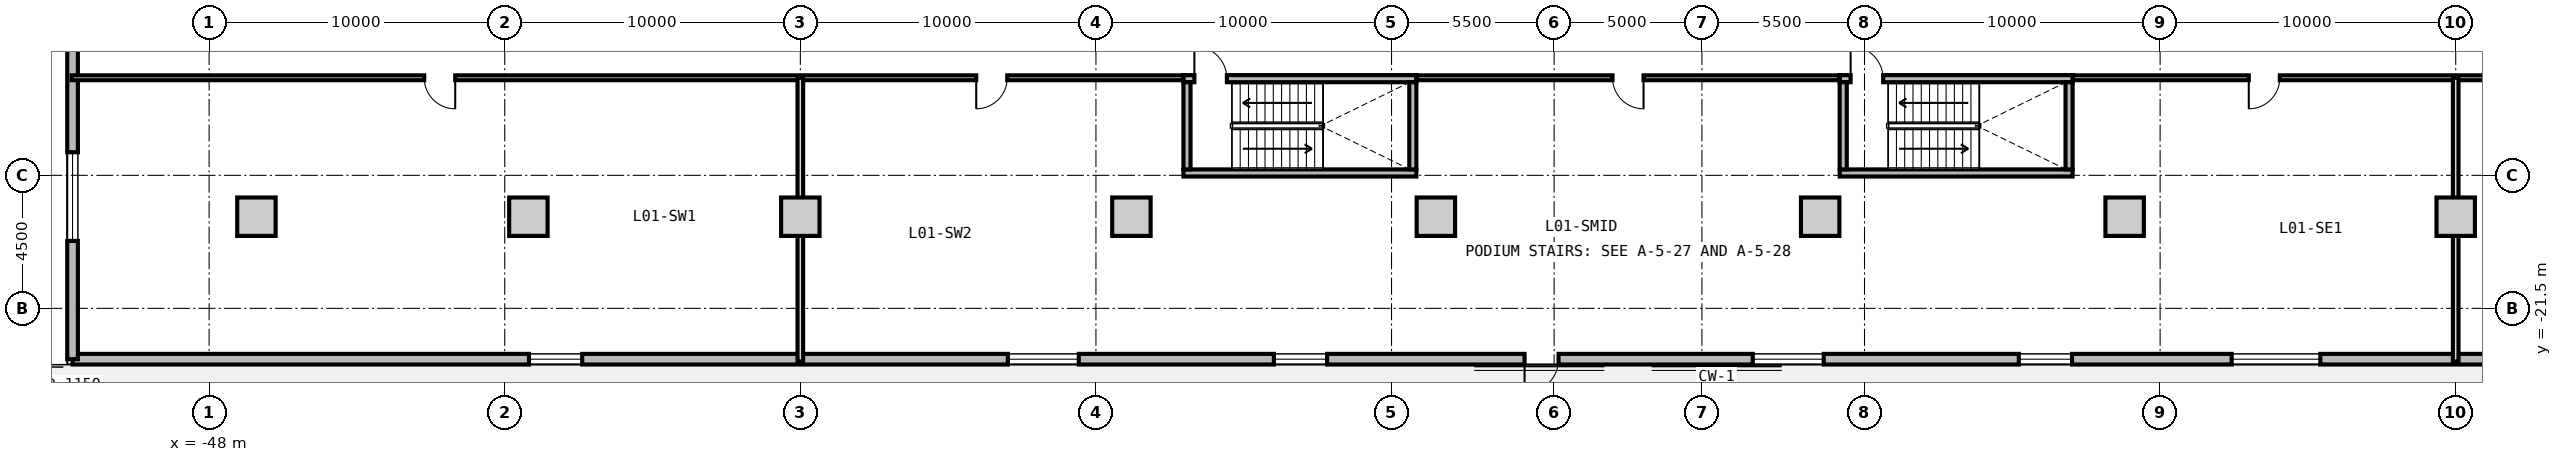
"""IFC4 building model, lengths in metres.
Left out: names, types, materials, properties, quantities, classifications, styles, units other than length and angle.
Written with IfcOpenShell. Run it as: python <this file> out.ifc"""

import sys

from ifc_helpers import new_model, si_unit, direction, frame, frame_2d, origin, origin_2d, place, context, subcontext, project, spatial, rectangle, extrude, source, transform, mapped, element, fill, save


model = new_model("IFC4")
c1 = context("Model", 3, precision=1e-05, world=origin(), true_north=direction((0.0, 1.0)))
c2 = subcontext(c1, "Body", "Model", "MODEL_VIEW")
j1 = project(units=[si_unit("LENGTHUNIT", "METRE"), si_unit("PLANEANGLEUNIT", "RADIAN")], contexts=[c1])
p1 = place(None, origin())
s1 = spatial("IfcSite", under=j1, at=p1, CompositionType="ELEMENT")
p2 = place(p1, origin())
s2 = spatial("IfcBuilding", under=s1, at=p2, CompositionType="ELEMENT")
p3 = place(p2, frame((0.0, 0.0, 4.2)))
s3 = spatial("IfcBuildingStorey", under=s2, at=p3, CompositionType="ELEMENT", Elevation=4.2)
m1 = source(origin(), c2, "Body", "SweptSolid", [
    extrude(rectangle(XDim=1.3, YDim=1.3, at=origin_2d()), origin(), (0.0, 0.0, 1.0), 4.2),
])
for number, where, z_axis, x_axis in (
    (1, (-46.4, -18.4, 0.0), (0.0, 0.0, 1.0), (1.0, 0.0, 0.0)),
    (2, (-37.2, -18.4, 0.0), (0.0, 0.0, 1.0), (1.0, 0.0, 0.0)),
    (3, (-28.0, -18.4, 0.0), (0.0, 0.0, 1.0), (1.0, 0.0, 0.0)),
    (4, (-16.8, -18.4, 0.0), (0.0, 0.0, 1.0), (1.0, 0.0, 0.0)),
    (5, (-6.5, -18.4, 0.0), (0.0, 0.0, 1.0), (1.0, 0.0, 0.0)),
    (6, (6.5, -18.4, 0.0), (0.0, 0.0, 1.0), (1.0, 0.0, 0.0)),
    (7, (16.8, -18.4, 0.0), (0.0, 0.0, 1.0), (1.0, 0.0, 0.0)),
    (8, (28.0, -18.4, 0.0), (0.0, 0.0, 1.0), (1.0, 0.0, 0.0)),
):
    element("IfcColumn", number, at=place(p3, frame(where, z_axis=z_axis, x_axis=x_axis)), inside=s3, PredefinedType="COLUMN", context=c2, shape_type="MappedRepresentation", body=[
        mapped(m1, transform((0.0, 0.0, 0.0), x_axis=(1.0, 0.0, 0.0), y_axis=(0.0, 1.0, 0.0), z_axis=(0.0, 0.0, 1.0), scale=1.0)),
    ])
m2 = source(origin(), c2, "Body", "SweptSolid", [
    extrude(rectangle(XDim=105.24, YDim=0.36, at=frame_2d((52.62, 0.0))), origin(), (0.0, 0.0, 1.0), 3.88),
])
p4 = place(p3, frame((52.62, -23.22, 0.0), z_axis=(0.0, 0.0, 1.0), x_axis=(-1.0, 0.0, 0.0)))
e9 = element("IfcWall", 9, at=p4, inside=s3, PredefinedType="SOLIDWALL", context=c2, shape_type="MappedRepresentation", body=[
    mapped(m2, transform((0.0, 0.0, 0.0), x_axis=(1.0, 0.0, 0.0), y_axis=(0.0, 1.0, 0.0), z_axis=(0.0, 0.0, 1.0), scale=1.0)),
])
p5 = place(p4, frame((54.97, 0.0, 0.0)))
e10 = element("IfcOpeningElement", 10, at=p5, cuts=e9, PredefinedType="OPENING", context=c2, shape_type="SweptSolid", body=[
    extrude(rectangle(XDim=1.15, YDim=2.25, at=frame_2d((0.575, 1.125))), frame((0.0, 0.19, 0.0), z_axis=(0.0, -1.0, 0.0), x_axis=(1.0, 0.0, 0.0)), (0.0, 0.0, 1.0), 0.38),
])
p6 = place(p4, frame((4.0, 0.0, 0.85)))
e11 = element("IfcOpeningElement", 11, at=p6, cuts=e9, PredefinedType="OPENING", context=c2, shape_type="SweptSolid", body=[
    extrude(rectangle(XDim=3.0, YDim=2.1, at=frame_2d((1.5, 1.05))), frame((0.0, 0.19, 0.0), z_axis=(0.0, -1.0, 0.0), x_axis=(1.0, 0.0, 0.0)), (0.0, 0.0, 1.0), 0.38),
])
p7 = place(p4, frame((12.4, 0.0, 0.9)))
e12 = element("IfcOpeningElement", 12, at=p7, cuts=e9, PredefinedType="OPENING", context=c2, shape_type="SweptSolid", body=[
    extrude(rectangle(XDim=1.8, YDim=2.0, at=frame_2d((0.9, 1.0))), frame((0.0, 0.19, 0.0), z_axis=(0.0, -1.0, 0.0), x_axis=(1.0, 0.0, 0.0)), (0.0, 0.0, 1.0), 0.38),
])
p8 = place(p4, frame((20.8, 0.0, 0.85)))
e13 = element("IfcOpeningElement", 13, at=p8, cuts=e9, PredefinedType="OPENING", context=c2, shape_type="SweptSolid", body=[
    extrude(rectangle(XDim=2.4, YDim=2.2, at=frame_2d((1.2, 1.1))), frame((0.0, 0.19, 0.0), z_axis=(0.0, -1.0, 0.0), x_axis=(1.0, 0.0, 0.0)), (0.0, 0.0, 1.0), 0.38),
])
p9 = place(p4, frame((29.2, 0.0, 0.85)))
e14 = element("IfcOpeningElement", 14, at=p9, cuts=e9, PredefinedType="OPENING", context=c2, shape_type="SweptSolid", body=[
    extrude(rectangle(XDim=3.0, YDim=2.1, at=frame_2d((1.5, 1.05))), frame((0.0, 0.19, 0.0), z_axis=(0.0, -1.0, 0.0), x_axis=(1.0, 0.0, 0.0)), (0.0, 0.0, 1.0), 0.38),
])
p10 = place(p4, frame((37.6, 0.0, 0.9)))
e15 = element("IfcOpeningElement", 15, at=p10, cuts=e9, PredefinedType="OPENING", context=c2, shape_type="SweptSolid", body=[
    extrude(rectangle(XDim=1.8, YDim=2.0, at=frame_2d((0.9, 1.0))), frame((0.0, 0.19, 0.0), z_axis=(0.0, -1.0, 0.0), x_axis=(1.0, 0.0, 0.0)), (0.0, 0.0, 1.0), 0.38),
])
p11 = place(p4, frame((46.0, 0.0, 0.85)))
e16 = element("IfcOpeningElement", 16, at=p11, cuts=e9, PredefinedType="OPENING", context=c2, shape_type="SweptSolid", body=[
    extrude(rectangle(XDim=2.4, YDim=2.2, at=frame_2d((1.2, 1.1))), frame((0.0, 0.19, 0.0), z_axis=(0.0, -1.0, 0.0), x_axis=(1.0, 0.0, 0.0)), (0.0, 0.0, 1.0), 0.38),
])
p12 = place(p4, frame((62.8, 0.0, 0.9)))
e17 = element("IfcOpeningElement", 17, at=p12, cuts=e9, PredefinedType="OPENING", context=c2, shape_type="SweptSolid", body=[
    extrude(rectangle(XDim=1.8, YDim=2.0, at=frame_2d((0.9, 1.0))), frame((0.0, 0.19, 0.0), z_axis=(0.0, -1.0, 0.0), x_axis=(1.0, 0.0, 0.0)), (0.0, 0.0, 1.0), 0.38),
])
p13 = place(p4, frame((71.2, 0.0, 0.85)))
e18 = element("IfcOpeningElement", 18, at=p13, cuts=e9, PredefinedType="OPENING", context=c2, shape_type="SweptSolid", body=[
    extrude(rectangle(XDim=2.4, YDim=2.2, at=frame_2d((1.2, 1.1))), frame((0.0, 0.19, 0.0), z_axis=(0.0, -1.0, 0.0), x_axis=(1.0, 0.0, 0.0)), (0.0, 0.0, 1.0), 0.38),
])
p14 = place(p4, frame((88.0, 0.0, 0.9)))
e19 = element("IfcOpeningElement", 19, at=p14, cuts=e9, PredefinedType="OPENING", context=c2, shape_type="SweptSolid", body=[
    extrude(rectangle(XDim=1.8, YDim=2.0, at=frame_2d((0.9, 1.0))), frame((0.0, 0.19, 0.0), z_axis=(0.0, -1.0, 0.0), x_axis=(1.0, 0.0, 0.0)), (0.0, 0.0, 1.0), 0.38),
])
m3 = source(origin(), c2, "Body", "SweptSolid", [
    extrude(rectangle(XDim=46.44, YDim=0.36, at=frame_2d((23.22, 0.0))), origin(), (0.0, 0.0, 1.0), 3.88),
])
p15 = place(p3, frame((-52.62, -23.22, 0.0), z_axis=(0.0, 0.0, 1.0), x_axis=(0.0, 1.0, 0.0)))
e20 = element("IfcWall", 20, at=p15, inside=s3, PredefinedType="SOLIDWALL", context=c2, shape_type="MappedRepresentation", body=[
    mapped(m3, transform((0.0, 0.0, 0.0), x_axis=(1.0, 0.0, 0.0), y_axis=(0.0, 1.0, 0.0), z_axis=(0.0, 0.0, 1.0), scale=1.0)),
])
p16 = place(p15, frame((4.0, 0.0, 0.85)))
e21 = element("IfcOpeningElement", 21, at=p16, cuts=e20, PredefinedType="OPENING", context=c2, shape_type="SweptSolid", body=[
    extrude(rectangle(XDim=3.0, YDim=2.1, at=frame_2d((1.5, 1.05))), frame((0.0, 0.19, 0.0), z_axis=(0.0, -1.0, 0.0), x_axis=(1.0, 0.0, 0.0)), (0.0, 0.0, 1.0), 0.38),
])
p17 = place(p15, frame((12.4, 0.0, 0.9)))
e22 = element("IfcOpeningElement", 22, at=p17, cuts=e20, PredefinedType="OPENING", context=c2, shape_type="SweptSolid", body=[
    extrude(rectangle(XDim=1.8, YDim=2.0, at=frame_2d((0.9, 1.0))), frame((0.0, 0.19, 0.0), z_axis=(0.0, -1.0, 0.0), x_axis=(1.0, 0.0, 0.0)), (0.0, 0.0, 1.0), 0.38),
])
m4 = source(origin(), c2, "Body", "SweptSolid", [
    extrude(rectangle(XDim=7.88, YDim=0.24, at=frame_2d((3.94, 0.0))), origin(), (0.0, 0.0, 1.0), 3.88),
])
p18 = place(p3, frame((-15.04, -13.73, 0.0), z_axis=(0.0, 0.0, 1.0), x_axis=(1.0, 0.0, 0.0)))
e23 = element("IfcWall", 23, at=p18, inside=s3, PredefinedType="PARTITIONING", context=c2, shape_type="MappedRepresentation", body=[
    mapped(m4, transform((0.0, 0.0, 0.0), x_axis=(1.0, 0.0, 0.0), y_axis=(0.0, 1.0, 0.0), z_axis=(0.0, 0.0, 1.0), scale=1.0)),
])
p19 = place(p18, frame((0.37, 0.0, 0.0)))
e24 = element("IfcOpeningElement", 24, at=p19, cuts=e23, PredefinedType="OPENING", context=c2, shape_type="SweptSolid", body=[
    extrude(rectangle(XDim=1.1, YDim=2.15, at=frame_2d((0.55, 1.075))), frame((0.0, 0.13, 0.0), z_axis=(0.0, -1.0, 0.0), x_axis=(1.0, 0.0, 0.0)), (0.0, 0.0, 1.0), 0.26),
])
p20 = place(p3, frame((-15.04, -16.92, 0.0), z_axis=(0.0, 0.0, 1.0), x_axis=(1.0, 0.0, 0.0)))
e25 = element("IfcWall", 25, at=p20, inside=s3, PredefinedType="PARTITIONING", context=c2, shape_type="MappedRepresentation", body=[
    mapped(m4, transform((0.0, 0.0, 0.0), x_axis=(1.0, 0.0, 0.0), y_axis=(0.0, 1.0, 0.0), z_axis=(0.0, 0.0, 1.0), scale=1.0)),
])
m5 = source(origin(), c2, "Body", "SweptSolid", [
    extrude(rectangle(XDim=2.95, YDim=0.24, at=frame_2d((1.475, 0.0))), origin(), (0.0, 0.0, 1.0), 3.88),
])
for number, where, z_axis, x_axis in (
    (26, (-14.92, -16.8, 0.0), (0.0, 0.0, 1.0), (0.0, 1.0, 0.0)),
    (27, (-7.28, -16.8, 0.0), (0.0, 0.0, 1.0), (0.0, 1.0, 0.0)),
):
    element("IfcWall", number, at=place(p3, frame(where, z_axis=z_axis, x_axis=x_axis)), inside=s3, PredefinedType="PARTITIONING", context=c2, shape_type="MappedRepresentation", body=[
        mapped(m5, transform((0.0, 0.0, 0.0), x_axis=(1.0, 0.0, 0.0), y_axis=(0.0, 1.0, 0.0), z_axis=(0.0, 0.0, 1.0), scale=1.0)),
    ])
p21 = place(p3, frame((7.16, -13.73, 0.0), z_axis=(0.0, 0.0, 1.0), x_axis=(1.0, 0.0, 0.0)))
e28 = element("IfcWall", 28, at=p21, inside=s3, PredefinedType="PARTITIONING", context=c2, shape_type="MappedRepresentation", body=[
    mapped(m4, transform((0.0, 0.0, 0.0), x_axis=(1.0, 0.0, 0.0), y_axis=(0.0, 1.0, 0.0), z_axis=(0.0, 0.0, 1.0), scale=1.0)),
])
p22 = place(p21, frame((0.37, 0.0, 0.0)))
e29 = element("IfcOpeningElement", 29, at=p22, cuts=e28, PredefinedType="OPENING", context=c2, shape_type="SweptSolid", body=[
    extrude(rectangle(XDim=1.1, YDim=2.15, at=frame_2d((0.55, 1.075))), frame((0.0, 0.13, 0.0), z_axis=(0.0, -1.0, 0.0), x_axis=(1.0, 0.0, 0.0)), (0.0, 0.0, 1.0), 0.26),
])
p23 = place(p3, frame((7.16, -16.92, 0.0), z_axis=(0.0, 0.0, 1.0), x_axis=(1.0, 0.0, 0.0)))
e30 = element("IfcWall", 30, at=p23, inside=s3, PredefinedType="PARTITIONING", context=c2, shape_type="MappedRepresentation", body=[
    mapped(m4, transform((0.0, 0.0, 0.0), x_axis=(1.0, 0.0, 0.0), y_axis=(0.0, 1.0, 0.0), z_axis=(0.0, 0.0, 1.0), scale=1.0)),
])
for number, where, z_axis, x_axis in (
    (31, (7.28, -16.8, 0.0), (0.0, 0.0, 1.0), (0.0, 1.0, 0.0)),
    (32, (14.92, -16.8, 0.0), (0.0, 0.0, 1.0), (0.0, 1.0, 0.0)),
):
    element("IfcWall", number, at=place(p3, frame(where, z_axis=z_axis, x_axis=x_axis)), inside=s3, PredefinedType="PARTITIONING", context=c2, shape_type="MappedRepresentation", body=[
        mapped(m5, transform((0.0, 0.0, 0.0), x_axis=(1.0, 0.0, 0.0), y_axis=(0.0, 1.0, 0.0), z_axis=(0.0, 0.0, 1.0), scale=1.0)),
    ])
m6 = source(origin(), c2, "Body", "SweptSolid", [
    extrude(rectangle(XDim=37.6, YDim=0.165, at=frame_2d((18.8, 0.0))), origin(), (0.0, 0.0, 1.0), 3.865),
])
p24 = place(p3, frame((-52.65, -13.7, 0.0), z_axis=(0.0, 0.0, 1.0), x_axis=(1.0, 0.0, 0.0)))
e33 = element("IfcWall", 33, at=p24, inside=s3, PredefinedType="PARTITIONING", context=c2, shape_type="MappedRepresentation", body=[
    mapped(m6, transform((0.0, 0.0, 0.0), x_axis=(1.0, 0.0, 0.0), y_axis=(0.0, 1.0, 0.0), z_axis=(0.0, 0.0, 1.0), scale=1.0)),
])
p25 = place(p24, frame((11.925, 0.0, 0.0)))
e34 = element("IfcOpeningElement", 34, at=p25, cuts=e33, PredefinedType="OPENING", context=c2, shape_type="SweptSolid", body=[
    extrude(rectangle(XDim=1.05, YDim=2.15, at=frame_2d((0.525, 1.075))), frame((0.0, 0.093, 0.0), z_axis=(0.0, -1.0, 0.0), x_axis=(1.0, 0.0, 0.0)), (0.0, 0.0, 1.0), 0.185),
])
p26 = place(p24, frame((30.6, 0.0, 0.0)))
e35 = element("IfcOpeningElement", 35, at=p26, cuts=e33, PredefinedType="OPENING", context=c2, shape_type="SweptSolid", body=[
    extrude(rectangle(XDim=1.05, YDim=2.15, at=frame_2d((0.525, 1.075))), frame((0.0, 0.093, 0.0), z_axis=(0.0, -1.0, 0.0), x_axis=(1.0, 0.0, 0.0)), (0.0, 0.0, 1.0), 0.185),
])
m7 = source(origin(), c2, "Body", "SweptSolid", [
    extrude(rectangle(XDim=14.3, YDim=0.165, at=frame_2d((7.15, 0.0))), origin(), (0.0, 0.0, 1.0), 3.865),
])
p27 = place(p3, frame((-7.15, -13.7, 0.0), z_axis=(0.0, 0.0, 1.0), x_axis=(1.0, 0.0, 0.0)))
e36 = element("IfcWall", 36, at=p27, inside=s3, PredefinedType="PARTITIONING", context=c2, shape_type="MappedRepresentation", body=[
    mapped(m7, transform((0.0, 0.0, 0.0), x_axis=(1.0, 0.0, 0.0), y_axis=(0.0, 1.0, 0.0), z_axis=(0.0, 0.0, 1.0), scale=1.0)),
])
p28 = place(p27, frame((6.625, 0.0, 0.0)))
e37 = element("IfcOpeningElement", 37, at=p28, cuts=e36, PredefinedType="OPENING", context=c2, shape_type="SweptSolid", body=[
    extrude(rectangle(XDim=1.05, YDim=2.15, at=frame_2d((0.525, 1.075))), frame((0.0, 0.093, 0.0), z_axis=(0.0, -1.0, 0.0), x_axis=(1.0, 0.0, 0.0)), (0.0, 0.0, 1.0), 0.185),
])
p29 = place(p3, frame((15.05, -13.7, 0.0), z_axis=(0.0, 0.0, 1.0), x_axis=(1.0, 0.0, 0.0)))
e38 = element("IfcWall", 38, at=p29, inside=s3, PredefinedType="PARTITIONING", context=c2, shape_type="MappedRepresentation", body=[
    mapped(m6, transform((0.0, 0.0, 0.0), x_axis=(1.0, 0.0, 0.0), y_axis=(0.0, 1.0, 0.0), z_axis=(0.0, 0.0, 1.0), scale=1.0)),
])
p30 = place(p29, frame((5.95, 0.0, 0.0)))
e39 = element("IfcOpeningElement", 39, at=p30, cuts=e38, PredefinedType="OPENING", context=c2, shape_type="SweptSolid", body=[
    extrude(rectangle(XDim=1.05, YDim=2.15, at=frame_2d((0.525, 1.075))), frame((0.0, 0.093, 0.0), z_axis=(0.0, -1.0, 0.0), x_axis=(1.0, 0.0, 0.0)), (0.0, 0.0, 1.0), 0.185),
])
p31 = place(p29, frame((24.625, 0.0, 0.0)))
e40 = element("IfcOpeningElement", 40, at=p31, cuts=e38, PredefinedType="OPENING", context=c2, shape_type="SweptSolid", body=[
    extrude(rectangle(XDim=1.05, YDim=2.15, at=frame_2d((0.525, 1.075))), frame((0.0, 0.093, 0.0), z_axis=(0.0, -1.0, 0.0), x_axis=(1.0, 0.0, 0.0)), (0.0, 0.0, 1.0), 0.185),
])
m8 = source(origin(), c2, "Body", "SweptSolid", [
    extrude(rectangle(XDim=9.6, YDim=0.19, at=frame_2d((4.8, 0.0))), origin(), (0.0, 0.0, 1.0), 3.865),
])
for number, where, z_axis, x_axis in (
    (41, (-28.0, -23.3, 0.0), (0.0, 0.0, 1.0), (0.0, 1.0, 0.0)),
    (42, (28.0, -23.3, 0.0), (0.0, 0.0, 1.0), (0.0, 1.0, 0.0)),
):
    element("IfcWall", number, at=place(p3, frame(where, z_axis=z_axis, x_axis=x_axis)), inside=s3, PredefinedType="PARTITIONING", context=c2, shape_type="MappedRepresentation", body=[
        mapped(m8, transform((0.0, 0.0, 0.0), x_axis=(1.0, 0.0, 0.0), y_axis=(0.0, 1.0, 0.0), z_axis=(0.0, 0.0, 1.0), scale=1.0)),
    ])
m9 = source(origin(), c2, "Body", "SweptSolid", [
    extrude(rectangle(XDim=1.15, YDim=2.25, at=frame_2d((0.575, 1.125))), frame((0.0, 0.025, 0.0), z_axis=(0.0, -1.0, 0.0), x_axis=(1.0, 0.0, 0.0)), (0.0, 0.0, 1.0), 0.05),
])
p32 = place(p5, origin())
e43 = element("IfcDoor", 43, at=p32, inside=s3, OperationType="SINGLE_SWING_RIGHT", PredefinedType="DOOR", context=c2, shape_type="MappedRepresentation", body=[
    mapped(m9, transform((0.0, 0.0, 0.0), x_axis=(1.0, 0.0, 0.0), y_axis=(0.0, 1.0, 0.0), z_axis=(0.0, 0.0, 1.0), scale=1.0)),
])
fill(e10, e43)
m10 = source(origin(), c2, "Body", "SweptSolid", [
    extrude(rectangle(XDim=3.0, YDim=2.1, at=frame_2d((1.5, 1.05))), frame((0.0, 0.03, 0.0), z_axis=(0.0, -1.0, 0.0), x_axis=(1.0, 0.0, 0.0)), (0.0, 0.0, 1.0), 0.06),
])
p33 = place(p9, origin())
e44 = element("IfcWindow", 44, at=p33, inside=s3, PartitioningType="SINGLE_PANEL", PredefinedType="WINDOW", context=c2, shape_type="MappedRepresentation", body=[
    mapped(m10, transform((0.0, 0.0, 0.0), x_axis=(1.0, 0.0, 0.0), y_axis=(0.0, 1.0, 0.0), z_axis=(0.0, 0.0, 1.0), scale=1.0)),
])
fill(e14, e44)
m11 = source(origin(), c2, "Body", "SweptSolid", [
    extrude(rectangle(XDim=1.8, YDim=2.0, at=frame_2d((0.9, 1.0))), frame((0.0, 0.03, 0.0), z_axis=(0.0, -1.0, 0.0), x_axis=(1.0, 0.0, 0.0)), (0.0, 0.0, 1.0), 0.06),
])
p34 = place(p10, origin())
e45 = element("IfcWindow", 45, at=p34, inside=s3, PartitioningType="SINGLE_PANEL", PredefinedType="WINDOW", context=c2, shape_type="MappedRepresentation", body=[
    mapped(m11, transform((0.0, 0.0, 0.0), x_axis=(1.0, 0.0, 0.0), y_axis=(0.0, 1.0, 0.0), z_axis=(0.0, 0.0, 1.0), scale=1.0)),
])
fill(e15, e45)
m12 = source(origin(), c2, "Body", "SweptSolid", [
    extrude(rectangle(XDim=2.4, YDim=2.2, at=frame_2d((1.2, 1.1))), frame((0.0, 0.03, 0.0), z_axis=(0.0, -1.0, 0.0), x_axis=(1.0, 0.0, 0.0)), (0.0, 0.0, 1.0), 0.06),
])
p35 = place(p11, origin())
e46 = element("IfcWindow", 46, at=p35, inside=s3, PartitioningType="SINGLE_PANEL", PredefinedType="WINDOW", context=c2, shape_type="MappedRepresentation", body=[
    mapped(m12, transform((0.0, 0.0, 0.0), x_axis=(1.0, 0.0, 0.0), y_axis=(0.0, 1.0, 0.0), z_axis=(0.0, 0.0, 1.0), scale=1.0)),
])
fill(e16, e46)
p36 = place(p12, origin())
e47 = element("IfcWindow", 47, at=p36, inside=s3, PartitioningType="SINGLE_PANEL", PredefinedType="WINDOW", context=c2, shape_type="MappedRepresentation", body=[
    mapped(m11, transform((0.0, 0.0, 0.0), x_axis=(1.0, 0.0, 0.0), y_axis=(0.0, 1.0, 0.0), z_axis=(0.0, 0.0, 1.0), scale=1.0)),
])
fill(e17, e47)
p37 = place(p13, origin())
e48 = element("IfcWindow", 48, at=p37, inside=s3, PartitioningType="SINGLE_PANEL", PredefinedType="WINDOW", context=c2, shape_type="MappedRepresentation", body=[
    mapped(m12, transform((0.0, 0.0, 0.0), x_axis=(1.0, 0.0, 0.0), y_axis=(0.0, 1.0, 0.0), z_axis=(0.0, 0.0, 1.0), scale=1.0)),
])
fill(e18, e48)
p38 = place(p14, origin())
e49 = element("IfcWindow", 49, at=p38, inside=s3, PartitioningType="SINGLE_PANEL", PredefinedType="WINDOW", context=c2, shape_type="MappedRepresentation", body=[
    mapped(m11, transform((0.0, 0.0, 0.0), x_axis=(1.0, 0.0, 0.0), y_axis=(0.0, 1.0, 0.0), z_axis=(0.0, 0.0, 1.0), scale=1.0)),
])
fill(e19, e49)
p39 = place(p16, origin())
e50 = element("IfcWindow", 50, at=p39, inside=s3, PartitioningType="SINGLE_PANEL", PredefinedType="WINDOW", context=c2, shape_type="MappedRepresentation", body=[
    mapped(m10, transform((0.0, 0.0, 0.0), x_axis=(1.0, 0.0, 0.0), y_axis=(0.0, 1.0, 0.0), z_axis=(0.0, 0.0, 1.0), scale=1.0)),
])
fill(e21, e50)
m13 = source(origin(), c2, "Body", "SweptSolid", [
    extrude(rectangle(XDim=1.1, YDim=2.15, at=frame_2d((0.55, 1.075))), frame((0.0, 0.025, 0.0), z_axis=(0.0, -1.0, 0.0), x_axis=(1.0, 0.0, 0.0)), (0.0, 0.0, 1.0), 0.05),
])
p40 = place(p19, origin())
e51 = element("IfcDoor", 51, at=p40, inside=s3, OperationType="SINGLE_SWING_LEFT", PredefinedType="DOOR", context=c2, shape_type="MappedRepresentation", body=[
    mapped(m13, transform((0.0, 0.0, 0.0), x_axis=(1.0, 0.0, 0.0), y_axis=(0.0, 1.0, 0.0), z_axis=(0.0, 0.0, 1.0), scale=1.0)),
])
fill(e24, e51)
p41 = place(p22, origin())
e52 = element("IfcDoor", 52, at=p41, inside=s3, OperationType="SINGLE_SWING_LEFT", PredefinedType="DOOR", context=c2, shape_type="MappedRepresentation", body=[
    mapped(m13, transform((0.0, 0.0, 0.0), x_axis=(1.0, 0.0, 0.0), y_axis=(0.0, 1.0, 0.0), z_axis=(0.0, 0.0, 1.0), scale=1.0)),
])
fill(e29, e52)
m14 = source(origin(), c2, "Body", "SweptSolid", [
    extrude(rectangle(XDim=1.05, YDim=2.15, at=frame_2d((0.525, 1.075))), frame((0.0, 0.025, 0.0), z_axis=(0.0, -1.0, 0.0), x_axis=(1.0, 0.0, 0.0)), (0.0, 0.0, 1.0), 0.05),
])
p42 = place(p25, frame((1.05, 0.0, 0.0), z_axis=(0.0, 0.0, 1.0), x_axis=(-1.0, 0.0, 0.0)))
e53 = element("IfcDoor", 53, at=p42, inside=s3, OperationType="SINGLE_SWING_LEFT", PredefinedType="DOOR", context=c2, shape_type="MappedRepresentation", body=[
    mapped(m14, transform((0.0, 0.0, 0.0), x_axis=(1.0, 0.0, 0.0), y_axis=(0.0, 1.0, 0.0), z_axis=(0.0, 0.0, 1.0), scale=1.0)),
])
fill(e34, e53)
p43 = place(p26, frame((1.05, 0.0, 0.0), z_axis=(0.0, 0.0, 1.0), x_axis=(-1.0, 0.0, 0.0)))
e54 = element("IfcDoor", 54, at=p43, inside=s3, OperationType="SINGLE_SWING_RIGHT", PredefinedType="DOOR", context=c2, shape_type="MappedRepresentation", body=[
    mapped(m14, transform((0.0, 0.0, 0.0), x_axis=(1.0, 0.0, 0.0), y_axis=(0.0, 1.0, 0.0), z_axis=(0.0, 0.0, 1.0), scale=1.0)),
])
fill(e35, e54)
p44 = place(p28, frame((1.05, 0.0, 0.0), z_axis=(0.0, 0.0, 1.0), x_axis=(-1.0, 0.0, 0.0)))
e55 = element("IfcDoor", 55, at=p44, inside=s3, OperationType="SINGLE_SWING_LEFT", PredefinedType="DOOR", context=c2, shape_type="MappedRepresentation", body=[
    mapped(m14, transform((0.0, 0.0, 0.0), x_axis=(1.0, 0.0, 0.0), y_axis=(0.0, 1.0, 0.0), z_axis=(0.0, 0.0, 1.0), scale=1.0)),
])
fill(e37, e55)
p45 = place(p30, frame((1.05, 0.0, 0.0), z_axis=(0.0, 0.0, 1.0), x_axis=(-1.0, 0.0, 0.0)))
e56 = element("IfcDoor", 56, at=p45, inside=s3, OperationType="SINGLE_SWING_RIGHT", PredefinedType="DOOR", context=c2, shape_type="MappedRepresentation", body=[
    mapped(m14, transform((0.0, 0.0, 0.0), x_axis=(1.0, 0.0, 0.0), y_axis=(0.0, 1.0, 0.0), z_axis=(0.0, 0.0, 1.0), scale=1.0)),
])
fill(e39, e56)
save(model, sys.argv[1])
